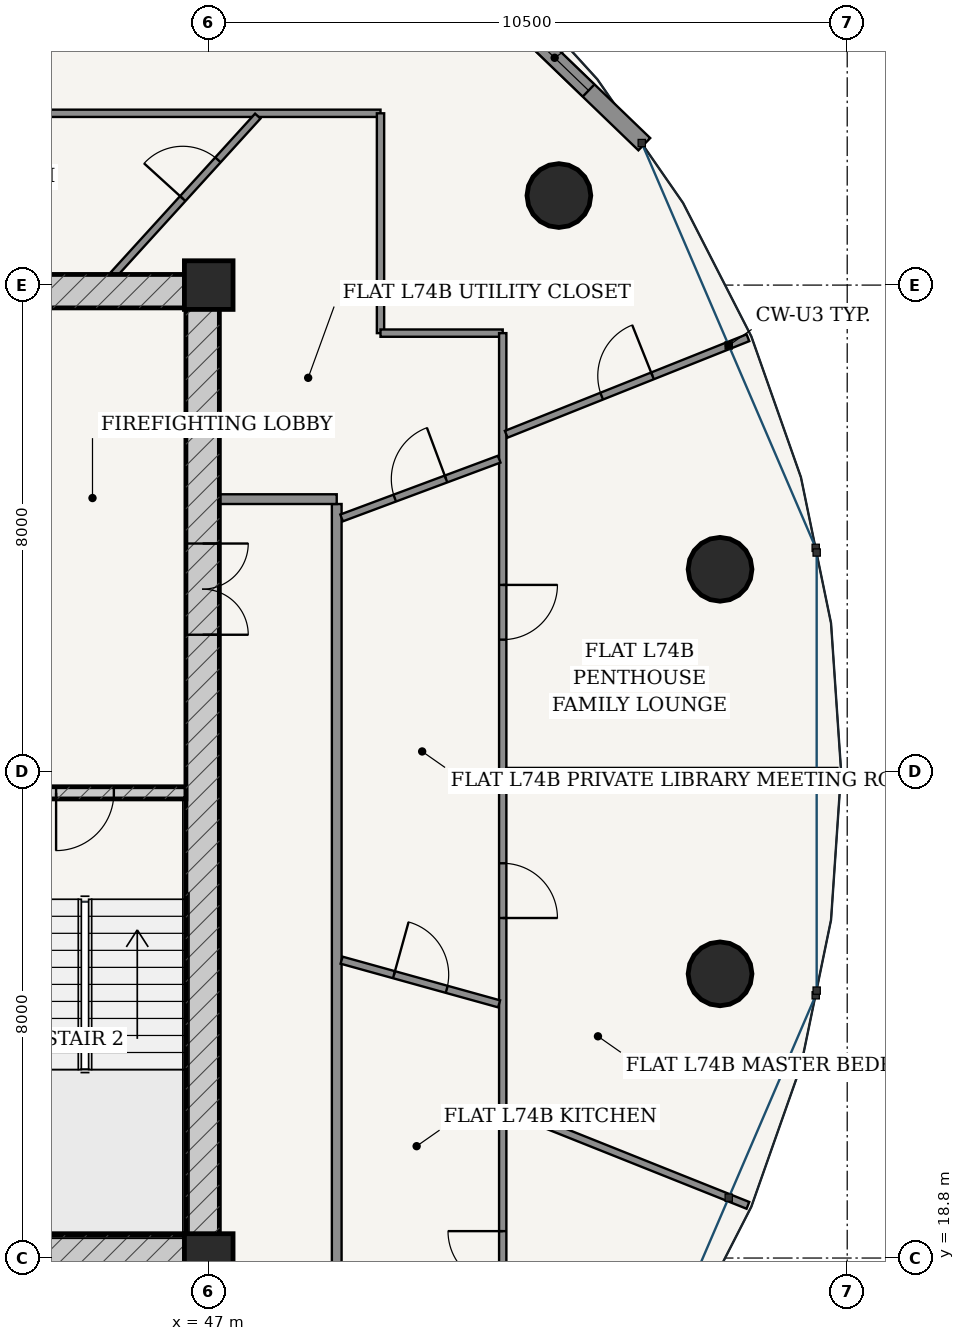
"""IFC4 building model, lengths in metres.
Left out: names, types, materials, properties, quantities, classifications, styles, units other than length and angle.
Written with IfcOpenShell. Run it as: python <this file> out.ifc"""

import sys

from ifc_helpers import new_model, si_unit, direction, frame, frame_2d, origin, origin_2d, place, context, subcontext, project, spatial, rectangle, hollow_circle, extrude, source, transform, mapped, element, fill, save


model = new_model("IFC4")
c1 = context("Model", 3, precision=1e-05, world=origin(), true_north=direction((-0.2419218956, 0.970295726276)))
c2 = subcontext(c1, "Body", "Model", "MODEL_VIEW")
j1 = project(units=[si_unit("LENGTHUNIT", "METRE"), si_unit("PLANEANGLEUNIT", "RADIAN")], contexts=[c1])
p1 = place(None, origin())
s1 = spatial("IfcSite", under=j1, at=p1, CompositionType="ELEMENT")
p2 = place(p1, origin())
s2 = spatial("IfcBuilding", under=s1, at=p2, CompositionType="ELEMENT")
p3 = place(p2, frame((0.0, 0.0, 281.95)))
s3 = spatial("IfcBuildingStorey", under=s2, at=p3, CompositionType="ELEMENT", Elevation=281.95)
for number, where, z_axis, x_axis in (
    (1, (47.0, 18.8, 0.0), (0.0, 0.0, 1.0), (1.0, 0.0, 0.0)),
    (2, (47.0, 34.8, 0.0), (0.0, 0.0, 1.0), (1.0, 0.0, 0.0)),
):
    element("IfcColumn", number, at=place(p3, frame(where, z_axis=z_axis, x_axis=x_axis)), inside=s3, PredefinedType="COLUMN", context=c2, shape_type="SweptSolid", body=[
        extrude(rectangle(XDim=0.8, YDim=0.8, at=origin_2d()), origin(), (0.0, 0.0, 1.0), 3.75),
    ])
p4 = place(p3, frame((28.825, 18.9, 0.0), z_axis=(0.0, 0.0, 1.0), x_axis=(1.0, 0.0, 0.0)))
e3 = element("IfcWall", 3, at=p4, inside=s3, PredefinedType="SHEAR", context=c2, shape_type="SweptSolid", body=[
    extrude(rectangle(XDim=18.35, YDim=0.55, at=frame_2d((9.175, 0.0))), origin(), (0.0, 0.0, 1.0), 3.49),
])
p5 = place(p4, frame((7.41, 0.0, 0.0)))
e4 = element("IfcOpeningElement", 4, at=p5, cuts=e3, PredefinedType="OPENING", context=c2, shape_type="SweptSolid", body=[
    extrude(rectangle(XDim=0.85, YDim=2.1, at=frame_2d((0.425, 1.05))), frame((0.0, 0.285, 0.0), z_axis=(0.0, -1.0, 0.0), x_axis=(1.0, 0.0, 0.0)), (0.0, 0.0, 1.0), 0.57),
])
p6 = place(p4, frame((10.49, 0.0, 0.0)))
e5 = element("IfcOpeningElement", 5, at=p6, cuts=e3, PredefinedType="OPENING", context=c2, shape_type="SweptSolid", body=[
    extrude(rectangle(XDim=0.85, YDim=2.1, at=frame_2d((0.425, 1.05))), frame((0.0, 0.285, 0.0), z_axis=(0.0, -1.0, 0.0), x_axis=(1.0, 0.0, 0.0)), (0.0, 0.0, 1.0), 0.57),
])
p7 = place(p3, frame((28.825, 34.7, 0.0), z_axis=(0.0, 0.0, 1.0), x_axis=(1.0, 0.0, 0.0)))
e6 = element("IfcWall", 6, at=p7, inside=s3, PredefinedType="SHEAR", context=c2, shape_type="SweptSolid", body=[
    extrude(rectangle(XDim=18.35, YDim=0.55, at=frame_2d((9.175, 0.0))), origin(), (0.0, 0.0, 1.0), 3.49),
])
p8 = place(p3, frame((46.9, 19.175, 0.0), z_axis=(0.0, 0.0, 1.0), x_axis=(0.0, 1.0, 0.0)))
e7 = element("IfcWall", 7, at=p8, inside=s3, PredefinedType="SHEAR", context=c2, shape_type="SweptSolid", body=[
    extrude(rectangle(XDim=15.25, YDim=0.55, at=frame_2d((7.625, 0.0))), origin(), (0.0, 0.0, 1.0), 3.49),
])
p9 = place(p8, frame((9.875, 0.0, 0.0)))
e8 = element("IfcOpeningElement", 8, at=p9, cuts=e7, PredefinedType="OPENING", context=c2, shape_type="SweptSolid", body=[
    extrude(rectangle(XDim=1.5, YDim=2.2, at=frame_2d((0.75, 1.1))), frame((0.0, 0.285, 0.0), z_axis=(0.0, -1.0, 0.0), x_axis=(1.0, 0.0, 0.0)), (0.0, 0.0, 1.0), 0.57),
])
p10 = place(p3, frame((43.305, 26.45, 0.0), z_axis=(0.0, 0.0, 1.0), x_axis=(1.0, 0.0, 0.0)))
e9 = element("IfcWall", 9, at=p10, inside=s3, PredefinedType="SOLIDWALL", context=c2, shape_type="SweptSolid", body=[
    extrude(rectangle(XDim=3.32, YDim=0.2, at=frame_2d((1.66, 0.0))), origin(), (0.0, 0.0, 1.0), 3.49),
])
p11 = place(p10, frame((1.185, 0.0, 0.0)))
e10 = element("IfcOpeningElement", 10, at=p11, cuts=e9, PredefinedType="OPENING", context=c2, shape_type="SweptSolid", body=[
    extrude(rectangle(XDim=0.95, YDim=2.15, at=frame_2d((0.475, 1.075))), frame((0.0, 0.11, 0.0), z_axis=(0.0, -1.0, 0.0), x_axis=(1.0, 0.0, 0.0)), (0.0, 0.0, 1.0), 0.22),
])
for number, where, z_axis, x_axis in (
    (11, (55.409, 30.126, 0.0), (0.0, 0.0, 1.0), (1.0, 0.0, 0.0)),
    (12, (52.759, 36.272, 0.0), (0.0, 0.0, 1.0), (1.0, 0.0, 0.0)),
    (13, (55.409, 23.474, 0.0), (0.0, 0.0, 1.0), (1.0, 0.0, 0.0)),
):
    element("IfcColumn", number, at=place(p3, frame(where, z_axis=z_axis, x_axis=x_axis)), inside=s3, PredefinedType="COLUMN", context=c2, shape_type="SweptSolid", body=[
        extrude(hollow_circle(Radius=0.525, WallThickness=0.035, at=origin_2d()), origin(), (0.0, 0.0, 1.0), 3.75),
    ])
p12 = place(p3, frame((54.163, 37.117, 0.0), z_axis=(0.0, 0.0, 1.0), x_axis=(-0.719979309073, 0.693995529169, 0.0)))
e14 = element("IfcWall", 14, at=p12, inside=s3, PredefinedType="SOLIDWALL", context=c2, shape_type="SweptSolid", body=[
    extrude(rectangle(XDim=7.583, YDim=0.28, at=frame_2d((3.791, 0.0))), origin(), (0.0, 0.0, 1.0), 3.49),
])
p13 = place(p12, frame((1.272, 0.0, 0.85)))
e15 = element("IfcOpeningElement", 15, at=p13, cuts=e14, PredefinedType="OPENING", context=c2, shape_type="SweptSolid", body=[
    extrude(rectangle(XDim=1.55, YDim=1.95, at=frame_2d((0.775, 0.975))), frame((0.0, 0.15, 0.0), z_axis=(0.0, -1.0, 0.0), x_axis=(1.0, 0.0, 0.0)), (0.0, 0.0, 1.0), 0.3),
])
p14 = place(p12, frame((4.76, 0.0, 0.85)))
e16 = element("IfcOpeningElement", 16, at=p14, cuts=e14, PredefinedType="OPENING", context=c2, shape_type="SweptSolid", body=[
    extrude(rectangle(XDim=1.55, YDim=1.95, at=frame_2d((0.775, 0.975))), frame((0.0, 0.15, 0.0), z_axis=(0.0, -1.0, 0.0), x_axis=(1.0, 0.0, 0.0)), (0.0, 0.0, 1.0), 0.3),
])
p15 = place(p3, frame((49.105, 17.275, 0.0), z_axis=(0.0, 0.0, 1.0), x_axis=(0.0, 1.0, 0.0)))
e17 = element("IfcWall", 17, at=p15, inside=s3, PredefinedType="PARTITIONING", context=c2, shape_type="SweptSolid", body=[
    extrude(rectangle(XDim=13.925, YDim=0.16, at=frame_2d((6.962, 0.0))), origin(), (0.0, 0.0, 1.0), 3.015),
])
p16 = place(p3, frame((47.175, 31.28, 0.0), z_axis=(0.0, 0.0, 1.0), x_axis=(1.0, 0.0, 0.0)))
e18 = element("IfcWall", 18, at=p16, inside=s3, PredefinedType="PARTITIONING", context=c2, shape_type="SweptSolid", body=[
    extrude(rectangle(XDim=1.93, YDim=0.16, at=frame_2d((0.965, 0.0))), origin(), (0.0, 0.0, 1.0), 3.49),
])
p17 = place(p3, frame((40.336, 37.625, 0.0), z_axis=(0.0, 0.0, 1.0), x_axis=(1.0, 0.0, 0.0)))
e19 = element("IfcWall", 19, at=p17, inside=s3, PredefinedType="PARTITIONING", context=c2, shape_type="SweptSolid", body=[
    extrude(rectangle(XDim=9.489, YDim=0.12, at=frame_2d((4.745, 0.0))), origin(), (0.0, 0.0, 1.0), 3.015),
])
p18 = place(p3, frame((49.825, 37.625, 0.0), z_axis=(0.0, 0.0, 1.0), x_axis=(0.0, -1.0, 0.0)))
e20 = element("IfcWall", 20, at=p18, inside=s3, PredefinedType="PARTITIONING", context=c2, shape_type="SweptSolid", body=[
    extrude(rectangle(XDim=3.615, YDim=0.12, at=frame_2d((1.808, 0.0))), origin(), (0.0, 0.0, 1.0), 3.015),
])
p19 = place(p3, frame((49.825, 34.01, 0.0), z_axis=(0.0, 0.0, 1.0), x_axis=(1.0, 0.0, 0.0)))
e21 = element("IfcWall", 21, at=p19, inside=s3, PredefinedType="PARTITIONING", context=c2, shape_type="SweptSolid", body=[
    extrude(rectangle(XDim=2.01, YDim=0.12, at=frame_2d((1.005, 0.0))), origin(), (0.0, 0.0, 1.0), 3.209),
])
p20 = place(p3, frame((51.835, 34.01, 0.0), z_axis=(0.0, 0.0, 1.0), x_axis=(0.0, -1.0, 0.0)))
e22 = element("IfcWall", 22, at=p20, inside=s3, PredefinedType="PARTITIONING", context=c2, shape_type="SweptSolid", body=[
    extrude(rectangle(XDim=19.545, YDim=0.12, at=frame_2d((9.772, 0.0))), origin(), (0.0, 0.0, 1.0), 3.015),
])
p21 = place(p20, frame((14.768, 0.0, 0.0)))
e23 = element("IfcOpeningElement", 23, at=p21, cuts=e22, PredefinedType="OPENING", context=c2, shape_type="SweptSolid", body=[
    extrude(rectangle(XDim=0.9, YDim=2.15, at=frame_2d((0.45, 1.075))), frame((0.0, 0.07, 0.0), z_axis=(0.0, -1.0, 0.0), x_axis=(1.0, 0.0, 0.0)), (0.0, 0.0, 1.0), 0.14),
])
p22 = place(p20, frame((8.718, 0.0, 0.0)))
e24 = element("IfcOpeningElement", 24, at=p22, cuts=e22, PredefinedType="OPENING", context=c2, shape_type="SweptSolid", body=[
    extrude(rectangle(XDim=0.9, YDim=2.15, at=frame_2d((0.45, 1.075))), frame((0.0, 0.07, 0.0), z_axis=(0.0, -1.0, 0.0), x_axis=(1.0, 0.0, 0.0)), (0.0, 0.0, 1.0), 0.14),
])
p23 = place(p20, frame((4.14, 0.0, 0.0)))
e25 = element("IfcOpeningElement", 25, at=p23, cuts=e22, PredefinedType="OPENING", context=c2, shape_type="SweptSolid", body=[
    extrude(rectangle(XDim=0.9, YDim=2.15, at=frame_2d((0.45, 1.075))), frame((0.0, 0.07, 0.0), z_axis=(0.0, -1.0, 0.0), x_axis=(1.0, 0.0, 0.0)), (0.0, 0.0, 1.0), 0.14),
])
p24 = place(p3, frame((51.893, 21.253, 0.0), z_axis=(0.0, 0.0, 1.0), x_axis=(0.928712556691, -0.370800467966, 0.0)))
e26 = element("IfcWall", 26, at=p24, inside=s3, PredefinedType="PARTITIONING", context=c2, shape_type="SweptSolid", body=[
    extrude(rectangle(XDim=4.28, YDim=0.12, at=frame_2d((2.14, 0.0))), origin(), (0.0, 0.0, 1.0), 3.121),
])
p25 = place(p3, frame((51.897, 26.8, 0.0), z_axis=(0.0, 0.0, 1.0), x_axis=(1.0, 0.0, 0.0)))
e27 = element("IfcWall", 27, at=p25, inside=s3, PredefinedType="PARTITIONING", context=c2, shape_type="SweptSolid", body=[
    extrude(rectangle(XDim=5.443, YDim=0.12, at=frame_2d((2.722, 0.0))), origin(), (0.0, 0.0, 1.0), 3.121),
])
p26 = place(p3, frame((51.893, 32.347, 0.0), z_axis=(0.0, 0.0, 1.0), x_axis=(0.928712556691, 0.370800467966, 0.0)))
e28 = element("IfcWall", 28, at=p26, inside=s3, PredefinedType="PARTITIONING", context=c2, shape_type="SweptSolid", body=[
    extrude(rectangle(XDim=4.28, YDim=0.12, at=frame_2d((2.14, 0.0))), origin(), (0.0, 0.0, 1.0), 3.121),
])
p27 = place(p26, frame((1.69, 0.0, 0.0)))
e29 = element("IfcOpeningElement", 29, at=p27, cuts=e28, PredefinedType="OPENING", context=c2, shape_type="SweptSolid", body=[
    extrude(rectangle(XDim=0.9, YDim=2.15, at=frame_2d((0.45, 1.075))), frame((0.0, 0.07, 0.0), z_axis=(0.0, -1.0, 0.0), x_axis=(1.0, 0.0, 0.0)), (0.0, 0.0, 1.0), 0.14),
])
p28 = place(p3, frame((49.185, 23.698, 0.0), z_axis=(0.0, 0.0, 1.0), x_axis=(0.963633636359, -0.267226897744, 0.0)))
e30 = element("IfcWall", 30, at=p28, inside=s3, PredefinedType="PARTITIONING", context=c2, shape_type="SweptSolid", body=[
    extrude(rectangle(XDim=2.688, YDim=0.12, at=frame_2d((1.344, 0.0))), origin(), (0.0, 0.0, 1.0), 3.209),
])
p29 = place(p28, frame((0.894, 0.0, 0.0)))
e31 = element("IfcOpeningElement", 31, at=p29, cuts=e30, PredefinedType="OPENING", context=c2, shape_type="SweptSolid", body=[
    extrude(rectangle(XDim=0.9, YDim=2.15, at=frame_2d((0.45, 1.075))), frame((0.0, 0.07, 0.0), z_axis=(0.0, -1.0, 0.0), x_axis=(1.0, 0.0, 0.0)), (0.0, 0.0, 1.0), 0.14),
])
p30 = place(p3, frame((49.185, 30.971, 0.0), z_axis=(0.0, 0.0, 1.0), x_axis=(0.93696600231, 0.349420535338, 0.0)))
e32 = element("IfcWall", 32, at=p30, inside=s3, PredefinedType="PARTITIONING", context=c2, shape_type="SweptSolid", body=[
    extrude(rectangle(XDim=2.766, YDim=0.12, at=frame_2d((1.383, 0.0))), origin(), (0.0, 0.0, 1.0), 3.209),
])
p31 = place(p30, frame((0.933, 0.0, 0.0)))
e33 = element("IfcOpeningElement", 33, at=p31, cuts=e32, PredefinedType="OPENING", context=c2, shape_type="SweptSolid", body=[
    extrude(rectangle(XDim=0.9, YDim=2.15, at=frame_2d((0.45, 1.075))), frame((0.0, 0.07, 0.0), z_axis=(0.0, -1.0, 0.0), x_axis=(1.0, 0.0, 0.0)), (0.0, 0.0, 1.0), 0.14),
])
p32 = place(p3, frame((45.439, 34.977, 0.0), z_axis=(0.0, 0.0, 1.0), x_axis=(0.672980108938, 0.739660579573, 0.0)))
e34 = element("IfcWall", 34, at=p32, inside=s3, PredefinedType="PARTITIONING", context=c2, shape_type="SweptSolid", body=[
    extrude(rectangle(XDim=3.519, YDim=0.12, at=frame_2d((1.759, 0.0))), origin(), (0.0, 0.0, 1.0), 3.015),
])
p33 = place(p32, frame((1.685, 0.0, 0.0)))
e35 = element("IfcOpeningElement", 35, at=p33, cuts=e34, PredefinedType="OPENING", context=c2, shape_type="SweptSolid", body=[
    extrude(rectangle(XDim=0.86, YDim=2.15, at=frame_2d((0.43, 1.075))), frame((0.0, 0.07, 0.0), z_axis=(0.0, -1.0, 0.0), x_axis=(1.0, 0.0, 0.0)), (0.0, 0.0, 1.0), 0.14),
])
m1 = source(origin(), c2, "Body", "SweptSolid", [
    extrude(rectangle(XDim=1.55, YDim=1.95, at=frame_2d((0.775, 0.975))), frame((0.0, 0.03, 0.0), z_axis=(0.0, -1.0, 0.0), x_axis=(1.0, 0.0, 0.0)), (0.0, 0.0, 1.0), 0.06),
])
p34 = place(p13, origin())
e36 = element("IfcWindow", 36, at=p34, inside=s3, PartitioningType="SINGLE_PANEL", PredefinedType="WINDOW", context=c2, shape_type="MappedRepresentation", body=[
    mapped(m1, transform((0.0, 0.0, 0.0), scale=1.0)),
])
fill(e15, e36)
m2 = source(origin(), c2, "Body", "SweptSolid", [
    extrude(rectangle(XDim=1.5, YDim=2.2, at=frame_2d((0.75, 1.1))), frame((0.0, 0.025, 0.0), z_axis=(0.0, -1.0, 0.0), x_axis=(1.0, 0.0, 0.0)), (0.0, 0.0, 1.0), 0.05),
])
p35 = place(p9, frame((1.5, 0.0, 0.0), z_axis=(0.0, 0.0, 1.0), x_axis=(-1.0, 0.0, 0.0)))
e37 = element("IfcDoor", 37, at=p35, inside=s3, OperationType="DOUBLE_DOOR_SINGLE_SWING", PredefinedType="DOOR", context=c2, shape_type="MappedRepresentation", body=[
    mapped(m2, transform((0.0, 0.0, 0.0), scale=1.0)),
])
fill(e8, e37)
m3 = source(origin(), c2, "Body", "SweptSolid", [
    extrude(rectangle(XDim=0.95, YDim=2.15, at=frame_2d((0.475, 1.075))), frame((0.0, 0.025, 0.0), z_axis=(0.0, -1.0, 0.0), x_axis=(1.0, 0.0, 0.0)), (0.0, 0.0, 1.0), 0.05),
])
p36 = place(p11, frame((0.95, 0.0, 0.0), z_axis=(0.0, 0.0, 1.0), x_axis=(-1.0, 0.0, 0.0)))
e38 = element("IfcDoor", 38, at=p36, inside=s3, OperationType="SINGLE_SWING_RIGHT", PredefinedType="DOOR", context=c2, shape_type="MappedRepresentation", body=[
    mapped(m3, transform((0.0, 0.0, 0.0), scale=1.0)),
])
fill(e10, e38)
m4 = source(origin(), c2, "Body", "SweptSolid", [
    extrude(rectangle(XDim=0.9, YDim=2.15, at=frame_2d((0.45, 1.075))), frame((0.0, 0.025, 0.0), z_axis=(0.0, -1.0, 0.0), x_axis=(1.0, 0.0, 0.0)), (0.0, 0.0, 1.0), 0.05),
])
p37 = place(p21, frame((0.9, 0.0, 0.0), z_axis=(0.0, 0.0, 1.0), x_axis=(-1.0, 0.0, 0.0)))
e39 = element("IfcDoor", 39, at=p37, inside=s3, OperationType="SINGLE_SWING_RIGHT", PredefinedType="DOOR", context=c2, shape_type="MappedRepresentation", body=[
    mapped(m4, transform((0.0, 0.0, 0.0), scale=1.0)),
])
fill(e23, e39)
p38 = place(p29, origin())
e40 = element("IfcDoor", 40, at=p38, inside=s3, OperationType="SINGLE_SWING_LEFT", PredefinedType="DOOR", context=c2, shape_type="MappedRepresentation", body=[
    mapped(m4, transform((0.0, 0.0, 0.0), scale=1.0)),
])
fill(e31, e40)
p39 = place(p31, origin())
e41 = element("IfcDoor", 41, at=p39, inside=s3, OperationType="SINGLE_SWING_RIGHT", PredefinedType="DOOR", context=c2, shape_type="MappedRepresentation", body=[
    mapped(m4, transform((0.0, 0.0, 0.0), scale=1.0)),
])
fill(e33, e41)
m5 = source(origin(), c2, "Body", "SweptSolid", [
    extrude(rectangle(XDim=0.86, YDim=2.15, at=frame_2d((0.43, 1.075))), frame((0.0, 0.025, 0.0), z_axis=(0.0, -1.0, 0.0), x_axis=(1.0, 0.0, 0.0)), (0.0, 0.0, 1.0), 0.05),
])
p40 = place(p33, origin())
e42 = element("IfcDoor", 42, at=p40, inside=s3, OperationType="SINGLE_SWING_LEFT", PredefinedType="DOOR", context=c2, shape_type="MappedRepresentation", body=[
    mapped(m5, transform((0.0, 0.0, 0.0), scale=1.0)),
])
fill(e35, e42)
p41 = place(p22, origin())
e43 = element("IfcDoor", 43, at=p41, inside=s3, OperationType="SINGLE_SWING_RIGHT", PredefinedType="DOOR", context=c2, shape_type="MappedRepresentation", body=[
    mapped(m4, transform((0.0, 0.0, 0.0), scale=1.0)),
])
fill(e24, e43)
p42 = place(p23, origin())
e44 = element("IfcDoor", 44, at=p42, inside=s3, OperationType="SINGLE_SWING_LEFT", PredefinedType="DOOR", context=c2, shape_type="MappedRepresentation", body=[
    mapped(m4, transform((0.0, 0.0, 0.0), scale=1.0)),
])
fill(e25, e44)
p43 = place(p27, origin())
e45 = element("IfcDoor", 45, at=p43, inside=s3, OperationType="SINGLE_SWING_RIGHT", PredefinedType="DOOR", context=c2, shape_type="MappedRepresentation", body=[
    mapped(m4, transform((0.0, 0.0, 0.0), scale=1.0)),
])
fill(e29, e45)
save(model, sys.argv[1])
